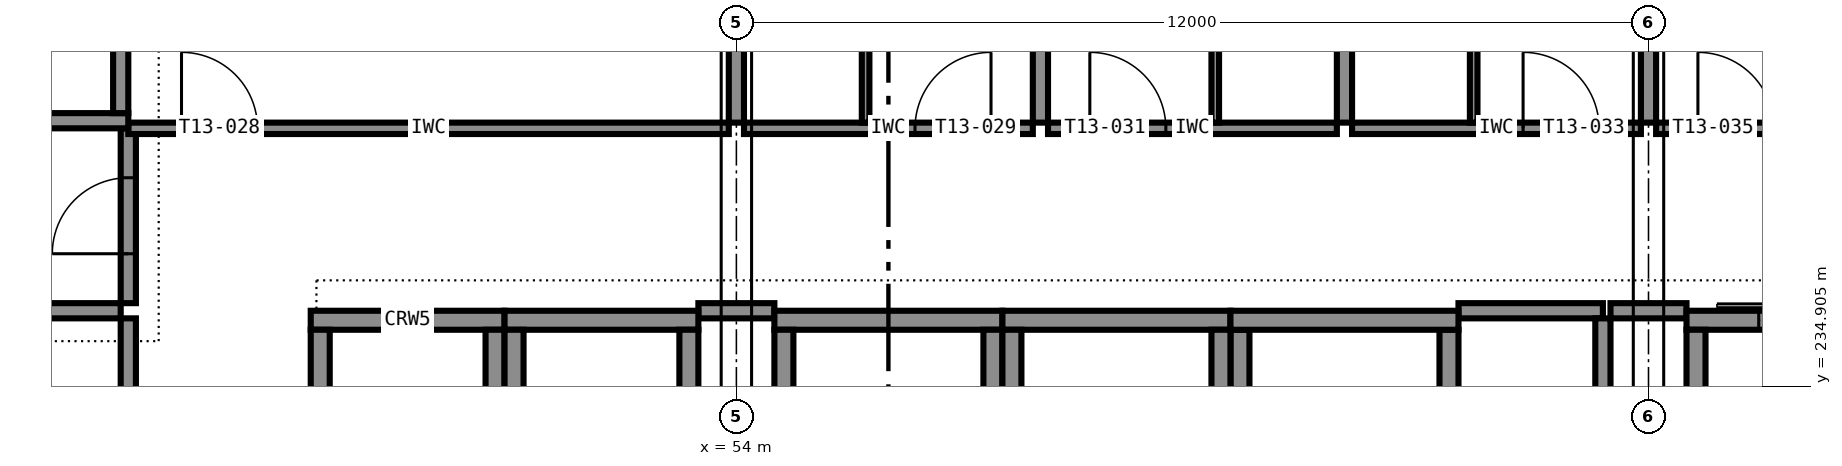
"""IFC4 building model, lengths in metres.
Left out: names, types, materials, properties, quantities, classifications, styles, units other than length and angle.
Written with IfcOpenShell. Run it as: python <this file> out.ifc"""

import sys

from ifc_helpers import new_model, si_unit, direction, frame, frame_2d, origin, place, context, subcontext, project, spatial, rectangle, extrude, element, fill, save


model = new_model("IFC4")
c1 = context("Model", 3, precision=1e-05, world=origin(), true_north=direction((0.0, 1.0)))
c2 = subcontext(c1, "Body", "Model", "MODEL_VIEW")
j1 = project(units=[si_unit("LENGTHUNIT", "METRE"), si_unit("PLANEANGLEUNIT", "RADIAN")], contexts=[c1])
p1 = place(None, origin())
s1 = spatial("IfcSite", under=j1, at=p1, CompositionType="ELEMENT")
p2 = place(p1, origin())
s2 = spatial("IfcBuilding", under=s1, at=p2, CompositionType="ELEMENT")
p3 = place(p2, frame((0.0, 0.0, 53.4)))
s3 = spatial("IfcBuildingStorey", under=s2, at=p3, CompositionType="ELEMENT", Elevation=53.4)
p4 = place(p3, frame((54.5, 235.775, 0.0), z_axis=(0.0, 0.0, 1.0), x_axis=(1.0, 0.0, 0.0)))
e1 = element("IfcWall", 1, at=p4, inside=s3, PredefinedType="SHEAR", context=c2, shape_type="SweptSolid", body=[
    extrude(rectangle(XDim=3.0, YDim=0.25, at=frame_2d((1.5, 0.0))), origin(), (0.0, 0.0, 1.0), 3.6),
])
for number, where, z_axis, x_axis in (
    (2, (54.625, 232.35, 0.0), (0.0, 0.0, 1.0), (0.0, 1.0, 0.0)),
    (3, (57.375, 232.35, 0.0), (0.0, 0.0, 1.0), (0.0, 1.0, 0.0)),
):
    element("IfcWall", number, at=place(p3, frame(where, z_axis=z_axis, x_axis=x_axis)), inside=s3, PredefinedType="SHEAR", context=c2, shape_type="SweptSolid", body=[
        extrude(rectangle(XDim=3.3, YDim=0.25, at=frame_2d((1.65, 0.0))), origin(), (0.0, 0.0, 1.0), 3.6),
    ])
p5 = place(p3, frame((57.5, 235.775, 0.0), z_axis=(0.0, 0.0, 1.0), x_axis=(1.0, 0.0, 0.0)))
e4 = element("IfcWall", 4, at=p5, inside=s3, PredefinedType="SHEAR", context=c2, shape_type="SweptSolid", body=[
    extrude(rectangle(XDim=3.0, YDim=0.25, at=frame_2d((1.5, 0.0))), origin(), (0.0, 0.0, 1.0), 3.6),
])
for number, where, z_axis, x_axis in (
    (5, (57.625, 232.35, 0.0), (0.0, 0.0, 1.0), (0.0, 1.0, 0.0)),
    (6, (60.375, 232.35, 0.0), (0.0, 0.0, 1.0), (0.0, 1.0, 0.0)),
):
    element("IfcWall", number, at=place(p3, frame(where, z_axis=z_axis, x_axis=x_axis)), inside=s3, PredefinedType="SHEAR", context=c2, shape_type="SweptSolid", body=[
        extrude(rectangle(XDim=3.3, YDim=0.25, at=frame_2d((1.65, 0.0))), origin(), (0.0, 0.0, 1.0), 3.6),
    ])
p6 = place(p3, frame((60.5, 235.775, 0.0), z_axis=(0.0, 0.0, 1.0), x_axis=(1.0, 0.0, 0.0)))
e7 = element("IfcWall", 7, at=p6, inside=s3, PredefinedType="SHEAR", context=c2, shape_type="SweptSolid", body=[
    extrude(rectangle(XDim=3.0, YDim=0.25, at=frame_2d((1.5, 0.0))), origin(), (0.0, 0.0, 1.0), 3.6),
])
for number, where, z_axis, x_axis in (
    (8, (60.625, 232.35, 0.0), (0.0, 0.0, 1.0), (0.0, 1.0, 0.0)),
    (9, (63.375, 232.35, 0.0), (0.0, 0.0, 1.0), (0.0, 1.0, 0.0)),
):
    element("IfcWall", number, at=place(p3, frame(where, z_axis=z_axis, x_axis=x_axis)), inside=s3, PredefinedType="SHEAR", context=c2, shape_type="SweptSolid", body=[
        extrude(rectangle(XDim=3.3, YDim=0.25, at=frame_2d((1.65, 0.0))), origin(), (0.0, 0.0, 1.0), 3.6),
    ])
p7 = place(p3, frame((66.5, 235.775, 0.0), z_axis=(0.0, 0.0, 1.0), x_axis=(1.0, 0.0, 0.0)))
e10 = element("IfcWall", 10, at=p7, inside=s3, PredefinedType="SHEAR", context=c2, shape_type="SweptSolid", body=[
    extrude(rectangle(XDim=3.0, YDim=0.25, at=frame_2d((1.5, 0.0))), origin(), (0.0, 0.0, 1.0), 3.6),
])
p8 = place(p7, frame((0.95, 0.0, 0.0)))
e11 = element("IfcOpeningElement", 11, at=p8, cuts=e10, PredefinedType="OPENING", context=c2, shape_type="SweptSolid", body=[
    extrude(rectangle(XDim=1.1, YDim=2.1, at=frame_2d((0.55, 1.05))), frame((0.0, 0.135, 0.0), z_axis=(0.0, -1.0, 0.0), x_axis=(1.0, 0.0, 0.0)), (0.0, 0.0, 1.0), 0.27),
])
p9 = place(p3, frame((66.625, 232.35, 0.0), z_axis=(0.0, 0.0, 1.0), x_axis=(0.0, 1.0, 0.0)))
e12 = element("IfcWall", 12, at=p9, inside=s3, PredefinedType="SHEAR", context=c2, shape_type="SweptSolid", body=[
    extrude(rectangle(XDim=3.3, YDim=0.25, at=frame_2d((1.65, 0.0))), origin(), (0.0, 0.0, 1.0), 3.6),
])
p10 = place(p3, frame((48.4, 235.775, 0.0), z_axis=(0.0, 0.0, 1.0), x_axis=(1.0, 0.0, 0.0)))
e13 = element("IfcWall", 13, at=p10, inside=s3, PredefinedType="SHEAR", context=c2, shape_type="SweptSolid", body=[
    extrude(rectangle(XDim=2.55, YDim=0.25, at=frame_2d((1.275, 0.0))), origin(), (0.0, 0.0, 1.0), 3.6),
])
for number, where, z_axis, x_axis in (
    (14, (48.525, 232.35, 0.0), (0.0, 0.0, 1.0), (0.0, 1.0, 0.0)),
    (15, (50.825, 232.35, 0.0), (0.0, 0.0, 1.0), (0.0, 1.0, 0.0)),
):
    element("IfcWall", number, at=place(p3, frame(where, z_axis=z_axis, x_axis=x_axis)), inside=s3, PredefinedType="SHEAR", context=c2, shape_type="SweptSolid", body=[
        extrude(rectangle(XDim=3.3, YDim=0.25, at=frame_2d((1.65, 0.0))), origin(), (0.0, 0.0, 1.0), 3.6),
    ])
p11 = place(p3, frame((50.95, 235.775, 0.0), z_axis=(0.0, 0.0, 1.0), x_axis=(1.0, 0.0, 0.0)))
e16 = element("IfcWall", 16, at=p11, inside=s3, PredefinedType="SHEAR", context=c2, shape_type="SweptSolid", body=[
    extrude(rectangle(XDim=2.55, YDim=0.25, at=frame_2d((1.275, 0.0))), origin(), (0.0, 0.0, 1.0), 3.6),
])
for number, where, z_axis, x_axis in (
    (17, (51.075, 232.35, 0.0), (0.0, 0.0, 1.0), (0.0, 1.0, 0.0)),
    (18, (53.375, 232.35, 0.0), (0.0, 0.0, 1.0), (0.0, 1.0, 0.0)),
):
    element("IfcWall", number, at=place(p3, frame(where, z_axis=z_axis, x_axis=x_axis)), inside=s3, PredefinedType="SHEAR", context=c2, shape_type="SweptSolid", body=[
        extrude(rectangle(XDim=3.3, YDim=0.25, at=frame_2d((1.65, 0.0))), origin(), (0.0, 0.0, 1.0), 3.6),
    ])
p12 = place(p3, frame((42.5, 238.4, 0.0), z_axis=(0.0, 0.0, 1.0), x_axis=(1.0, 0.0, 0.0)))
e19 = element("IfcWall", 19, at=p12, inside=s3, PredefinedType="SHEAR", context=c2, shape_type="SweptSolid", body=[
    extrude(rectangle(XDim=3.5, YDim=0.2, at=frame_2d((1.75, 0.0))), origin(), (0.0, 0.0, 1.0), 3.6),
])
p13 = place(p12, frame((1.15, 0.0, 0.0)))
e20 = element("IfcOpeningElement", 20, at=p13, cuts=e19, PredefinedType="OPENING", context=c2, shape_type="SweptSolid", body=[
    extrude(rectangle(XDim=1.2, YDim=2.1, at=frame_2d((0.6, 1.05))), frame((0.0, 0.11, 0.0), z_axis=(0.0, -1.0, 0.0), x_axis=(1.0, 0.0, 0.0)), (0.0, 0.0, 1.0), 0.22),
])
p14 = place(p3, frame((45.9, 238.5, 0.0), z_axis=(0.0, 0.0, 1.0), x_axis=(0.0, 1.0, 0.0)))
e21 = element("IfcWall", 21, at=p14, inside=s3, PredefinedType="SHEAR", context=c2, shape_type="SweptSolid", body=[
    extrude(rectangle(XDim=7.0, YDim=0.2, at=frame_2d((3.5, 0.0))), origin(), (0.0, 0.0, 1.0), 3.6),
])
p15 = place(p3, frame((42.3, 235.9, 0.0), z_axis=(0.0, 0.0, 1.0), x_axis=(1.0, 0.0, 0.0)))
e22 = element("IfcWall", 22, at=p15, inside=s3, PredefinedType="PARTITIONING", context=c2, shape_type="SweptSolid", body=[
    extrude(rectangle(XDim=3.6, YDim=0.2, at=frame_2d((1.8, 0.0))), origin(), (0.0, 0.0, 1.0), 3.4),
])
p16 = place(p3, frame((53.5, 235.9, 0.0), z_axis=(0.0, 0.0, 1.0), x_axis=(1.0, 0.0, 0.0)))
e23 = element("IfcWall", 23, at=p16, inside=s3, PredefinedType="PARTITIONING", context=c2, shape_type="SweptSolid", body=[
    extrude(rectangle(XDim=1.0, YDim=0.2, at=frame_2d((0.5, 0.0))), origin(), (0.0, 0.0, 1.0), 3.4),
])
p17 = place(p3, frame((63.5, 235.9, 0.0), z_axis=(0.0, 0.0, 1.0), x_axis=(1.0, 0.0, 0.0)))
e24 = element("IfcWall", 24, at=p17, inside=s3, PredefinedType="PARTITIONING", context=c2, shape_type="SweptSolid", body=[
    extrude(rectangle(XDim=1.9, YDim=0.2, at=frame_2d((0.95, 0.0))), origin(), (0.0, 0.0, 1.0), 3.4),
])
p18 = place(p3, frame((65.5, 235.9, 0.0), z_axis=(0.0, 0.0, 1.0), x_axis=(1.0, 0.0, 0.0)))
e25 = element("IfcWall", 25, at=p18, inside=s3, PredefinedType="PARTITIONING", context=c2, shape_type="SweptSolid", body=[
    extrude(rectangle(XDim=1.0, YDim=0.2, at=frame_2d((0.5, 0.0))), origin(), (0.0, 0.0, 1.0), 3.4),
])
p19 = place(p3, frame((46.0, 232.2, 0.0), z_axis=(0.0, 0.0, 1.0), x_axis=(0.0, 1.0, 0.0)))
e26 = element("IfcWall", 26, at=p19, inside=s3, PredefinedType="PARTITIONING", context=c2, shape_type="SweptSolid", body=[
    extrude(rectangle(XDim=3.6, YDim=0.2, at=frame_2d((1.8, 0.0))), origin(), (0.0, 0.0, 1.0), 3.4),
])
p20 = place(p19, frame((1.35, 0.0, 0.0)))
e27 = element("IfcOpeningElement", 27, at=p20, cuts=e26, PredefinedType="OPENING", context=c2, shape_type="SweptSolid", body=[
    extrude(rectangle(XDim=0.9, YDim=2.1, at=frame_2d((0.45, 1.05))), frame((0.0, 0.11, 0.0), z_axis=(0.0, -1.0, 0.0), x_axis=(1.0, 0.0, 0.0)), (0.0, 0.0, 1.0), 0.22),
])
p21 = place(p3, frame((46.0, 236.0, 0.0), z_axis=(0.0, 0.0, 1.0), x_axis=(0.0, 1.0, 0.0)))
e28 = element("IfcWall", 28, at=p21, inside=s3, PredefinedType="PARTITIONING", context=c2, shape_type="SweptSolid", body=[
    extrude(rectangle(XDim=2.3, YDim=0.2, at=frame_2d((1.15, 0.0))), origin(), (0.0, 0.0, 1.0), 3.4),
])
p22 = place(p21, frame((0.65, 0.0, 0.0)))
e29 = element("IfcOpeningElement", 29, at=p22, cuts=e28, PredefinedType="OPENING", context=c2, shape_type="SweptSolid", body=[
    extrude(rectangle(XDim=1.0, YDim=2.1, at=frame_2d((0.5, 1.05))), frame((0.0, 0.11, 0.0), z_axis=(0.0, -1.0, 0.0), x_axis=(1.0, 0.0, 0.0)), (0.0, 0.0, 1.0), 0.22),
])
p23 = place(p3, frame((65.4, 232.2, 0.0), z_axis=(0.0, 0.0, 1.0), x_axis=(0.0, 1.0, 0.0)))
e30 = element("IfcWall", 30, at=p23, inside=s3, PredefinedType="PARTITIONING", context=c2, shape_type="SweptSolid", body=[
    extrude(rectangle(XDim=3.6, YDim=0.2, at=frame_2d((1.8, 0.0))), origin(), (0.0, 0.0, 1.0), 3.4),
])
p24 = place(p3, frame((46.0, 238.3, 0.0), z_axis=(0.0, 0.0, 1.0), x_axis=(1.0, 0.0, 0.0)))
e31 = element("IfcWall", 31, at=p24, inside=s3, PredefinedType="PARTITIONING", context=c2, shape_type="SweptSolid", body=[
    extrude(rectangle(XDim=7.9, YDim=0.15, at=frame_2d((3.95, 0.0))), origin(), (0.0, 0.0, 1.0), 3.4),
])
p25 = place(p24, frame((0.7, 0.0, 0.0)))
e32 = element("IfcOpeningElement", 32, at=p25, cuts=e31, PredefinedType="OPENING", context=c2, shape_type="SweptSolid", body=[
    extrude(rectangle(XDim=1.0, YDim=2.1, at=frame_2d((0.5, 1.05))), frame((0.0, 0.085, 0.0), z_axis=(0.0, -1.0, 0.0), x_axis=(1.0, 0.0, 0.0)), (0.0, 0.0, 1.0), 0.17),
])
p26 = place(p3, frame((54.1, 238.3, 0.0), z_axis=(0.0, 0.0, 1.0), x_axis=(1.0, 0.0, 0.0)))
e33 = element("IfcWall", 33, at=p26, inside=s3, PredefinedType="PARTITIONING", context=c2, shape_type="SweptSolid", body=[
    extrude(rectangle(XDim=3.8, YDim=0.15, at=frame_2d((1.9, 0.0))), origin(), (0.0, 0.0, 1.0), 3.4),
])
p27 = place(p26, frame((2.25, 0.0, 0.0)))
e34 = element("IfcOpeningElement", 34, at=p27, cuts=e33, PredefinedType="OPENING", context=c2, shape_type="SweptSolid", body=[
    extrude(rectangle(XDim=1.0, YDim=2.1, at=frame_2d((0.5, 1.05))), frame((0.0, 0.085, 0.0), z_axis=(0.0, -1.0, 0.0), x_axis=(1.0, 0.0, 0.0)), (0.0, 0.0, 1.0), 0.17),
])
p28 = place(p3, frame((55.7, 241.25, 0.0), z_axis=(0.0, 0.0, 1.0), x_axis=(0.0, -1.0, 0.0)))
e35 = element("IfcWall", 35, at=p28, inside=s3, PredefinedType="PARTITIONING", context=c2, shape_type="SweptSolid", body=[
    extrude(rectangle(XDim=2.875, YDim=0.1, at=frame_2d((1.438, 0.0))), origin(), (0.0, 0.0, 1.0), 3.4),
])
p29 = place(p28, frame((1.038, 0.0, 0.0)))
e36 = element("IfcOpeningElement", 36, at=p29, cuts=e35, PredefinedType="OPENING", context=c2, shape_type="SweptSolid", body=[
    extrude(rectangle(XDim=0.8, YDim=2.1, at=frame_2d((0.4, 1.05))), frame((0.0, 0.06, 0.0), z_axis=(0.0, -1.0, 0.0), x_axis=(1.0, 0.0, 0.0)), (0.0, 0.0, 1.0), 0.12),
])
p30 = place(p3, frame((58.1, 238.3, 0.0), z_axis=(0.0, 0.0, 1.0), x_axis=(1.0, 0.0, 0.0)))
e37 = element("IfcWall", 37, at=p30, inside=s3, PredefinedType="PARTITIONING", context=c2, shape_type="SweptSolid", body=[
    extrude(rectangle(XDim=3.8, YDim=0.15, at=frame_2d((1.9, 0.0))), origin(), (0.0, 0.0, 1.0), 3.4),
])
p31 = place(p30, frame((0.55, 0.0, 0.0)))
e38 = element("IfcOpeningElement", 38, at=p31, cuts=e37, PredefinedType="OPENING", context=c2, shape_type="SweptSolid", body=[
    extrude(rectangle(XDim=1.0, YDim=2.1, at=frame_2d((0.5, 1.05))), frame((0.0, 0.085, 0.0), z_axis=(0.0, -1.0, 0.0), x_axis=(1.0, 0.0, 0.0)), (0.0, 0.0, 1.0), 0.17),
])
p32 = place(p3, frame((60.3, 238.375, 0.0), z_axis=(0.0, 0.0, 1.0), x_axis=(0.0, 1.0, 0.0)))
e39 = element("IfcWall", 39, at=p32, inside=s3, PredefinedType="PARTITIONING", context=c2, shape_type="SweptSolid", body=[
    extrude(rectangle(XDim=2.875, YDim=0.1, at=frame_2d((1.438, 0.0))), origin(), (0.0, 0.0, 1.0), 3.4),
])
p33 = place(p32, frame((1.038, 0.0, 0.0)))
e40 = element("IfcOpeningElement", 40, at=p33, cuts=e39, PredefinedType="OPENING", context=c2, shape_type="SweptSolid", body=[
    extrude(rectangle(XDim=0.8, YDim=2.1, at=frame_2d((0.4, 1.05))), frame((0.0, 0.06, 0.0), z_axis=(0.0, -1.0, 0.0), x_axis=(1.0, 0.0, 0.0)), (0.0, 0.0, 1.0), 0.12),
])
p34 = place(p3, frame((62.1, 238.3, 0.0), z_axis=(0.0, 0.0, 1.0), x_axis=(1.0, 0.0, 0.0)))
e41 = element("IfcWall", 41, at=p34, inside=s3, PredefinedType="PARTITIONING", context=c2, shape_type="SweptSolid", body=[
    extrude(rectangle(XDim=3.8, YDim=0.15, at=frame_2d((1.9, 0.0))), origin(), (0.0, 0.0, 1.0), 3.4),
])
p35 = place(p34, frame((2.25, 0.0, 0.0)))
e42 = element("IfcOpeningElement", 42, at=p35, cuts=e41, PredefinedType="OPENING", context=c2, shape_type="SweptSolid", body=[
    extrude(rectangle(XDim=1.0, YDim=2.1, at=frame_2d((0.5, 1.05))), frame((0.0, 0.085, 0.0), z_axis=(0.0, -1.0, 0.0), x_axis=(1.0, 0.0, 0.0)), (0.0, 0.0, 1.0), 0.17),
])
p36 = place(p3, frame((63.7, 241.25, 0.0), z_axis=(0.0, 0.0, 1.0), x_axis=(0.0, -1.0, 0.0)))
e43 = element("IfcWall", 43, at=p36, inside=s3, PredefinedType="PARTITIONING", context=c2, shape_type="SweptSolid", body=[
    extrude(rectangle(XDim=2.875, YDim=0.1, at=frame_2d((1.438, 0.0))), origin(), (0.0, 0.0, 1.0), 3.4),
])
p37 = place(p36, frame((1.038, 0.0, 0.0)))
e44 = element("IfcOpeningElement", 44, at=p37, cuts=e43, PredefinedType="OPENING", context=c2, shape_type="SweptSolid", body=[
    extrude(rectangle(XDim=0.8, YDim=2.1, at=frame_2d((0.4, 1.05))), frame((0.0, 0.06, 0.0), z_axis=(0.0, -1.0, 0.0), x_axis=(1.0, 0.0, 0.0)), (0.0, 0.0, 1.0), 0.12),
])
p38 = place(p3, frame((66.1, 238.3, 0.0), z_axis=(0.0, 0.0, 1.0), x_axis=(1.0, 0.0, 0.0)))
e45 = element("IfcWall", 45, at=p38, inside=s3, PredefinedType="PARTITIONING", context=c2, shape_type="SweptSolid", body=[
    extrude(rectangle(XDim=3.8, YDim=0.15, at=frame_2d((1.9, 0.0))), origin(), (0.0, 0.0, 1.0), 3.4),
])
p39 = place(p38, frame((0.55, 0.0, 0.0)))
e46 = element("IfcOpeningElement", 46, at=p39, cuts=e45, PredefinedType="OPENING", context=c2, shape_type="SweptSolid", body=[
    extrude(rectangle(XDim=1.0, YDim=2.1, at=frame_2d((0.5, 1.05))), frame((0.0, 0.085, 0.0), z_axis=(0.0, -1.0, 0.0), x_axis=(1.0, 0.0, 0.0)), (0.0, 0.0, 1.0), 0.17),
])
p40 = place(p3, frame((54.0, 245.65, 0.0), z_axis=(0.0, 0.0, 1.0), x_axis=(0.0, -1.0, 0.0)))
e47 = element("IfcWall", 47, at=p40, inside=s3, PredefinedType="PARTITIONING", context=c2, shape_type="SweptSolid", body=[
    extrude(rectangle(XDim=7.275, YDim=0.2, at=frame_2d((3.637, 0.0))), origin(), (0.0, 0.0, 1.0), 2.6),
])
for number, where, z_axis, x_axis in (
    (48, (58.0, 245.7, 0.0), (0.0, 0.0, 1.0), (0.0, -1.0, 0.0)),
    (49, (62.0, 245.7, 0.0), (0.0, 0.0, 1.0), (0.0, -1.0, 0.0)),
):
    element("IfcWall", number, at=place(p3, frame(where, z_axis=z_axis, x_axis=x_axis)), inside=s3, PredefinedType="PARTITIONING", context=c2, shape_type="SweptSolid", body=[
        extrude(rectangle(XDim=7.325, YDim=0.2, at=frame_2d((3.663, 0.0))), origin(), (0.0, 0.0, 1.0), 3.4),
    ])
p41 = place(p3, frame((66.0, 245.65, 0.0), z_axis=(0.0, 0.0, 1.0), x_axis=(0.0, -1.0, 0.0)))
e50 = element("IfcWall", 50, at=p41, inside=s3, PredefinedType="PARTITIONING", context=c2, shape_type="SweptSolid", body=[
    extrude(rectangle(XDim=7.275, YDim=0.2, at=frame_2d((3.637, 0.0))), origin(), (0.0, 0.0, 1.0), 2.6),
])
p42 = place(p22, origin())
e51 = element("IfcDoor", 51, at=p42, inside=s3, OperationType="SINGLE_SWING_LEFT", PredefinedType="DOOR", context=c2, shape_type="SweptSolid", body=[
    extrude(rectangle(XDim=1.0, YDim=2.1, at=frame_2d((0.5, 1.05))), frame((0.0, 0.025, 0.0), z_axis=(0.0, -1.0, 0.0), x_axis=(1.0, 0.0, 0.0)), (0.0, 0.0, 1.0), 0.05),
])
fill(e29, e51)
p43 = place(p25, origin())
e52 = element("IfcDoor", 52, at=p43, inside=s3, OperationType="SINGLE_SWING_LEFT", PredefinedType="DOOR", context=c2, shape_type="SweptSolid", body=[
    extrude(rectangle(XDim=1.0, YDim=2.1, at=frame_2d((0.5, 1.05))), frame((0.0, 0.025, 0.0), z_axis=(0.0, -1.0, 0.0), x_axis=(1.0, 0.0, 0.0)), (0.0, 0.0, 1.0), 0.05),
])
fill(e32, e52)
p44 = place(p27, origin())
e53 = element("IfcDoor", 53, at=p44, inside=s3, OperationType="SINGLE_SWING_RIGHT", PredefinedType="DOOR", context=c2, shape_type="SweptSolid", body=[
    extrude(rectangle(XDim=1.0, YDim=2.1, at=frame_2d((0.5, 1.05))), frame((0.0, 0.025, 0.0), z_axis=(0.0, -1.0, 0.0), x_axis=(1.0, 0.0, 0.0)), (0.0, 0.0, 1.0), 0.05),
])
fill(e34, e53)
p45 = place(p31, origin())
e54 = element("IfcDoor", 54, at=p45, inside=s3, OperationType="SINGLE_SWING_LEFT", PredefinedType="DOOR", context=c2, shape_type="SweptSolid", body=[
    extrude(rectangle(XDim=1.0, YDim=2.1, at=frame_2d((0.5, 1.05))), frame((0.0, 0.025, 0.0), z_axis=(0.0, -1.0, 0.0), x_axis=(1.0, 0.0, 0.0)), (0.0, 0.0, 1.0), 0.05),
])
fill(e38, e54)
p46 = place(p35, origin())
e55 = element("IfcDoor", 55, at=p46, inside=s3, OperationType="SINGLE_SWING_LEFT", PredefinedType="DOOR", context=c2, shape_type="SweptSolid", body=[
    extrude(rectangle(XDim=1.0, YDim=2.1, at=frame_2d((0.5, 1.05))), frame((0.0, 0.025, 0.0), z_axis=(0.0, -1.0, 0.0), x_axis=(1.0, 0.0, 0.0)), (0.0, 0.0, 1.0), 0.05),
])
fill(e42, e55)
p47 = place(p39, origin())
e56 = element("IfcDoor", 56, at=p47, inside=s3, OperationType="SINGLE_SWING_LEFT", PredefinedType="DOOR", context=c2, shape_type="SweptSolid", body=[
    extrude(rectangle(XDim=1.0, YDim=2.1, at=frame_2d((0.5, 1.05))), frame((0.0, 0.025, 0.0), z_axis=(0.0, -1.0, 0.0), x_axis=(1.0, 0.0, 0.0)), (0.0, 0.0, 1.0), 0.05),
])
fill(e46, e56)
p48 = place(p8, origin())
e57 = element("IfcDoor", 57, at=p48, inside=s3, OperationType="SLIDING_TO_LEFT", PredefinedType="DOOR", context=c2, shape_type="SweptSolid", body=[
    extrude(rectangle(XDim=1.1, YDim=2.1, at=frame_2d((0.55, 1.05))), frame((0.0, 0.025, 0.0), z_axis=(0.0, -1.0, 0.0), x_axis=(1.0, 0.0, 0.0)), (0.0, 0.0, 1.0), 0.05),
])
fill(e11, e57)
save(model, sys.argv[1])
